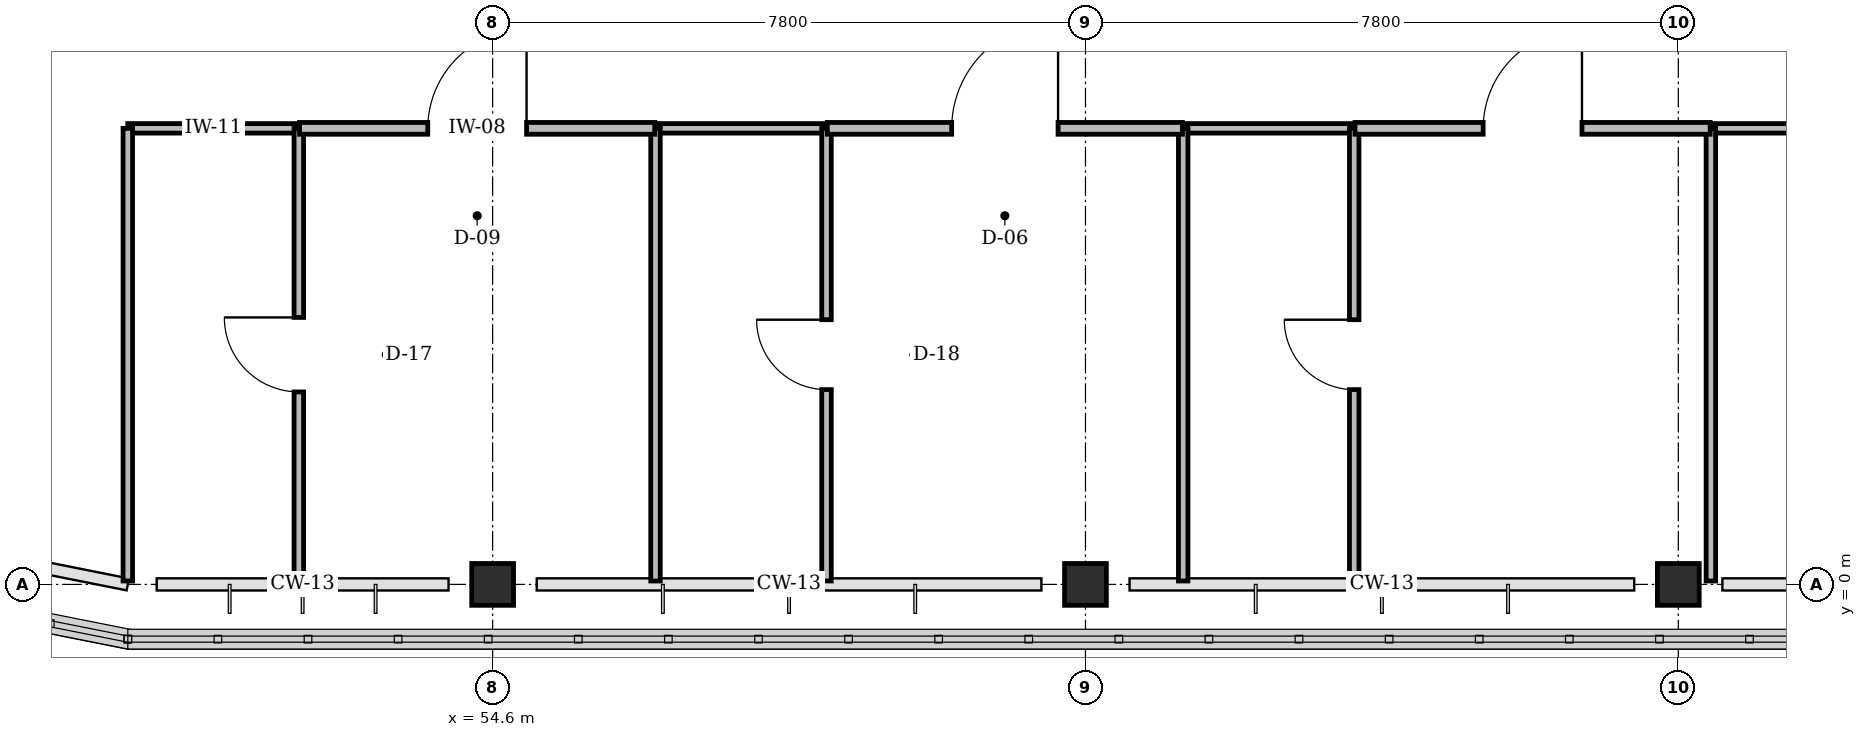
"""IFC4 building model, lengths in metres.
Left out: names, types, materials, properties, quantities, classifications, styles, units other than length and angle.
Written with IfcOpenShell. Run it as: python <this file> out.ifc"""

import sys

from ifc_helpers import new_model, si_unit, direction, frame, frame_2d, origin, origin_2d, place, context, subcontext, project, spatial, rectangle, extrude, element, fill, save


model = new_model("IFC4")
c1 = context("Model", 3, precision=1e-05, world=origin(), true_north=direction((0.0, 1.0)))
c2 = subcontext(c1, "Body", "Model", "MODEL_VIEW")
j1 = project(units=[si_unit("LENGTHUNIT", "METRE"), si_unit("PLANEANGLEUNIT", "RADIAN")], contexts=[c1])
p1 = place(None, origin())
s1 = spatial("IfcSite", under=j1, at=p1, CompositionType="ELEMENT")
p2 = place(p1, origin())
s2 = spatial("IfcBuilding", under=s1, at=p2, CompositionType="ELEMENT")
p3 = place(p2, frame((0.0, 0.0, 34.8)))
s3 = spatial("IfcBuildingStorey", under=s2, at=p3, CompositionType="ELEMENT", Elevation=34.8)
for number, where, z_axis, x_axis in (
    (1, (54.6, 0.0, 0.0), (0.0, 0.0, 1.0), (1.0, 0.0, 0.0)),
    (2, (62.4, 0.0, 0.0), (0.0, 0.0, 1.0), (1.0, 0.0, 0.0)),
    (3, (70.2, 0.0, 0.0), (0.0, 0.0, 1.0), (1.0, 0.0, 0.0)),
):
    element("IfcColumn", number, at=place(p3, frame(where, z_axis=z_axis, x_axis=x_axis)), inside=s3, PredefinedType="COLUMN", context=c2, shape_type="SweptSolid", body=[
        extrude(rectangle(XDim=0.55, YDim=0.55, at=origin_2d()), origin(), (0.0, 0.0, 1.0), 4.2),
    ])
p4 = place(p3, frame((49.8, 6.0, 0.0), z_axis=(0.0, 0.0, 1.0), x_axis=(1.0, 0.0, 0.0)))
e4 = element("IfcWall", 4, at=p4, inside=s3, PredefinedType="PARTITIONING", context=c2, shape_type="SweptSolid", body=[
    extrude(rectangle(XDim=2.25, YDim=0.125, at=frame_2d((1.125, 0.0))), origin(), (0.0, 0.0, 1.0), 3.9),
])
p5 = place(p3, frame((49.8, 0.045, 0.0), z_axis=(0.0, 0.0, 1.0), x_axis=(0.0, 1.0, 0.0)))
e5 = element("IfcWall", 5, at=p5, inside=s3, PredefinedType="PARTITIONING", context=c2, shape_type="SweptSolid", body=[
    extrude(rectangle(XDim=5.955, YDim=0.125, at=frame_2d((2.978, 0.0))), origin(), (0.0, 0.0, 1.0), 3.9),
])
p6 = place(p3, frame((52.05, 0.045, 0.0), z_axis=(0.0, 0.0, 1.0), x_axis=(0.0, 1.0, 0.0)))
e6 = element("IfcWall", 6, at=p6, inside=s3, PredefinedType="PARTITIONING", context=c2, shape_type="SweptSolid", body=[
    extrude(rectangle(XDim=5.955, YDim=0.125, at=frame_2d((2.978, 0.0))), origin(), (0.0, 0.0, 1.0), 3.9),
])
p7 = place(p6, frame((2.488, 0.0, 0.0)))
e7 = element("IfcOpeningElement", 7, at=p7, cuts=e6, PredefinedType="OPENING", context=c2, shape_type="SweptSolid", body=[
    extrude(rectangle(XDim=0.98, YDim=2.1, at=frame_2d((0.49, 1.05))), frame((0.0, 0.073, 0.0), z_axis=(0.0, -1.0, 0.0), x_axis=(1.0, 0.0, 0.0)), (0.0, 0.0, 1.0), 0.145),
])
p8 = place(p3, frame((56.743, 6.0, 0.0), z_axis=(0.0, 0.0, 1.0), x_axis=(1.0, 0.0, 0.0)))
e8 = element("IfcWall", 8, at=p8, inside=s3, PredefinedType="PARTITIONING", context=c2, shape_type="SweptSolid", body=[
    extrude(rectangle(XDim=2.25, YDim=0.125, at=frame_2d((1.125, 0.0))), origin(), (0.0, 0.0, 1.0), 3.9),
])
p9 = place(p3, frame((56.743, 0.045, 0.0), z_axis=(0.0, 0.0, 1.0), x_axis=(0.0, 1.0, 0.0)))
e9 = element("IfcWall", 9, at=p9, inside=s3, PredefinedType="PARTITIONING", context=c2, shape_type="SweptSolid", body=[
    extrude(rectangle(XDim=5.955, YDim=0.125, at=frame_2d((2.978, 0.0))), origin(), (0.0, 0.0, 1.0), 3.9),
])
p10 = place(p3, frame((58.993, 0.045, 0.0), z_axis=(0.0, 0.0, 1.0), x_axis=(0.0, 1.0, 0.0)))
e10 = element("IfcWall", 10, at=p10, inside=s3, PredefinedType="PARTITIONING", context=c2, shape_type="SweptSolid", body=[
    extrude(rectangle(XDim=5.955, YDim=0.125, at=frame_2d((2.978, 0.0))), origin(), (0.0, 0.0, 1.0), 3.9),
])
p11 = place(p10, frame((2.518, 0.0, 0.0)))
e11 = element("IfcOpeningElement", 11, at=p11, cuts=e10, PredefinedType="OPENING", context=c2, shape_type="SweptSolid", body=[
    extrude(rectangle(XDim=0.92, YDim=2.1, at=frame_2d((0.46, 1.05))), frame((0.0, 0.073, 0.0), z_axis=(0.0, -1.0, 0.0), x_axis=(1.0, 0.0, 0.0)), (0.0, 0.0, 1.0), 0.145),
])
p12 = place(p3, frame((63.686, 6.0, 0.0), z_axis=(0.0, 0.0, 1.0), x_axis=(1.0, 0.0, 0.0)))
e12 = element("IfcWall", 12, at=p12, inside=s3, PredefinedType="PARTITIONING", context=c2, shape_type="SweptSolid", body=[
    extrude(rectangle(XDim=2.25, YDim=0.125, at=frame_2d((1.125, 0.0))), origin(), (0.0, 0.0, 1.0), 3.9),
])
p13 = place(p3, frame((63.686, 0.045, 0.0), z_axis=(0.0, 0.0, 1.0), x_axis=(0.0, 1.0, 0.0)))
e13 = element("IfcWall", 13, at=p13, inside=s3, PredefinedType="PARTITIONING", context=c2, shape_type="SweptSolid", body=[
    extrude(rectangle(XDim=5.955, YDim=0.125, at=frame_2d((2.978, 0.0))), origin(), (0.0, 0.0, 1.0), 3.9),
])
p14 = place(p3, frame((65.936, 0.045, 0.0), z_axis=(0.0, 0.0, 1.0), x_axis=(0.0, 1.0, 0.0)))
e14 = element("IfcWall", 14, at=p14, inside=s3, PredefinedType="PARTITIONING", context=c2, shape_type="SweptSolid", body=[
    extrude(rectangle(XDim=5.955, YDim=0.125, at=frame_2d((2.978, 0.0))), origin(), (0.0, 0.0, 1.0), 3.9),
])
p15 = place(p14, frame((2.518, 0.0, 0.0)))
e15 = element("IfcOpeningElement", 15, at=p15, cuts=e14, PredefinedType="OPENING", context=c2, shape_type="SweptSolid", body=[
    extrude(rectangle(XDim=0.92, YDim=2.1, at=frame_2d((0.46, 1.05))), frame((0.0, 0.073, 0.0), z_axis=(0.0, -1.0, 0.0), x_axis=(1.0, 0.0, 0.0)), (0.0, 0.0, 1.0), 0.145),
])
p16 = place(p3, frame((70.629, 6.0, 0.0), z_axis=(0.0, 0.0, 1.0), x_axis=(1.0, 0.0, 0.0)))
e16 = element("IfcWall", 16, at=p16, inside=s3, PredefinedType="PARTITIONING", context=c2, shape_type="SweptSolid", body=[
    extrude(rectangle(XDim=2.25, YDim=0.125, at=frame_2d((1.125, 0.0))), origin(), (0.0, 0.0, 1.0), 3.9),
])
p17 = place(p3, frame((70.629, 0.045, 0.0), z_axis=(0.0, 0.0, 1.0), x_axis=(0.0, 1.0, 0.0)))
e17 = element("IfcWall", 17, at=p17, inside=s3, PredefinedType="PARTITIONING", context=c2, shape_type="SweptSolid", body=[
    extrude(rectangle(XDim=5.955, YDim=0.125, at=frame_2d((2.978, 0.0))), origin(), (0.0, 0.0, 1.0), 3.32),
])
p18 = place(p3, frame((52.06, 6.0, 0.0), z_axis=(0.0, 0.0, 1.0), x_axis=(1.0, 0.0, 0.0)))
e18 = element("IfcWall", 18, at=p18, inside=s3, PredefinedType="PARTITIONING", context=c2, shape_type="SweptSolid", body=[
    extrude(rectangle(XDim=4.673, YDim=0.155, at=frame_2d((2.336, 0.0))), origin(), (0.0, 0.0, 1.0), 3.9),
])
p19 = place(p18, frame((1.687, 0.0, 0.0)))
e19 = element("IfcOpeningElement", 19, at=p19, cuts=e18, PredefinedType="OPENING", context=c2, shape_type="SweptSolid", body=[
    extrude(rectangle(XDim=1.3, YDim=2.15, at=frame_2d((0.65, 1.075))), frame((0.0, 0.087, 0.0), z_axis=(0.0, -1.0, 0.0), x_axis=(1.0, 0.0, 0.0)), (0.0, 0.0, 1.0), 0.175),
])
p20 = place(p3, frame((59.003, 6.0, 0.0), z_axis=(0.0, 0.0, 1.0), x_axis=(1.0, 0.0, 0.0)))
e20 = element("IfcWall", 20, at=p20, inside=s3, PredefinedType="PARTITIONING", context=c2, shape_type="SweptSolid", body=[
    extrude(rectangle(XDim=4.673, YDim=0.155, at=frame_2d((2.336, 0.0))), origin(), (0.0, 0.0, 1.0), 3.9),
])
p21 = place(p20, frame((1.636, 0.0, 0.0)))
e21 = element("IfcOpeningElement", 21, at=p21, cuts=e20, PredefinedType="OPENING", context=c2, shape_type="SweptSolid", body=[
    extrude(rectangle(XDim=1.4, YDim=2.2, at=frame_2d((0.7, 1.1))), frame((0.0, 0.087, 0.0), z_axis=(0.0, -1.0, 0.0), x_axis=(1.0, 0.0, 0.0)), (0.0, 0.0, 1.0), 0.175),
])
p22 = place(p3, frame((65.946, 6.0, 0.0), z_axis=(0.0, 0.0, 1.0), x_axis=(1.0, 0.0, 0.0)))
e22 = element("IfcWall", 22, at=p22, inside=s3, PredefinedType="PARTITIONING", context=c2, shape_type="SweptSolid", body=[
    extrude(rectangle(XDim=4.673, YDim=0.155, at=frame_2d((2.336, 0.0))), origin(), (0.0, 0.0, 1.0), 3.9),
])
p23 = place(p22, frame((1.687, 0.0, 0.0)))
e23 = element("IfcOpeningElement", 23, at=p23, cuts=e22, PredefinedType="OPENING", context=c2, shape_type="SweptSolid", body=[
    extrude(rectangle(XDim=1.3, YDim=2.15, at=frame_2d((0.65, 1.075))), frame((0.0, 0.087, 0.0), z_axis=(0.0, -1.0, 0.0), x_axis=(1.0, 0.0, 0.0)), (0.0, 0.0, 1.0), 0.175),
])
p24 = place(p7, origin())
e24 = element("IfcDoor", 24, at=p24, inside=s3, OperationType="SINGLE_SWING_RIGHT", PredefinedType="DOOR", context=c2, shape_type="SweptSolid", body=[
    extrude(rectangle(XDim=0.98, YDim=2.1, at=frame_2d((0.49, 1.05))), frame((0.0, 0.025, 0.0), z_axis=(0.0, -1.0, 0.0), x_axis=(1.0, 0.0, 0.0)), (0.0, 0.0, 1.0), 0.05),
])
fill(e7, e24)
p25 = place(p11, origin())
e25 = element("IfcDoor", 25, at=p25, inside=s3, OperationType="SINGLE_SWING_RIGHT", PredefinedType="DOOR", context=c2, shape_type="SweptSolid", body=[
    extrude(rectangle(XDim=0.92, YDim=2.1, at=frame_2d((0.46, 1.05))), frame((0.0, 0.025, 0.0), z_axis=(0.0, -1.0, 0.0), x_axis=(1.0, 0.0, 0.0)), (0.0, 0.0, 1.0), 0.05),
])
fill(e11, e25)
p26 = place(p15, origin())
e26 = element("IfcDoor", 26, at=p26, inside=s3, OperationType="SINGLE_SWING_RIGHT", PredefinedType="DOOR", context=c2, shape_type="SweptSolid", body=[
    extrude(rectangle(XDim=0.92, YDim=2.1, at=frame_2d((0.46, 1.05))), frame((0.0, 0.025, 0.0), z_axis=(0.0, -1.0, 0.0), x_axis=(1.0, 0.0, 0.0)), (0.0, 0.0, 1.0), 0.05),
])
fill(e15, e26)
p27 = place(p19, origin())
e27 = element("IfcDoor", 27, at=p27, inside=s3, OperationType="SINGLE_SWING_RIGHT", PredefinedType="DOOR", context=c2, shape_type="SweptSolid", body=[
    extrude(rectangle(XDim=1.3, YDim=2.15, at=frame_2d((0.65, 1.075))), frame((0.0, 0.025, 0.0), z_axis=(0.0, -1.0, 0.0), x_axis=(1.0, 0.0, 0.0)), (0.0, 0.0, 1.0), 0.05),
])
fill(e19, e27)
p28 = place(p21, origin())
e28 = element("IfcDoor", 28, at=p28, inside=s3, OperationType="SINGLE_SWING_RIGHT", PredefinedType="DOOR", context=c2, shape_type="SweptSolid", body=[
    extrude(rectangle(XDim=1.4, YDim=2.2, at=frame_2d((0.7, 1.1))), frame((0.0, 0.025, 0.0), z_axis=(0.0, -1.0, 0.0), x_axis=(1.0, 0.0, 0.0)), (0.0, 0.0, 1.0), 0.05),
])
fill(e21, e28)
p29 = place(p23, origin())
e29 = element("IfcDoor", 29, at=p29, inside=s3, OperationType="SINGLE_SWING_RIGHT", PredefinedType="DOOR", context=c2, shape_type="SweptSolid", body=[
    extrude(rectangle(XDim=1.3, YDim=2.15, at=frame_2d((0.65, 1.075))), frame((0.0, 0.025, 0.0), z_axis=(0.0, -1.0, 0.0), x_axis=(1.0, 0.0, 0.0)), (0.0, 0.0, 1.0), 0.05),
])
fill(e23, e29)
save(model, sys.argv[1])
